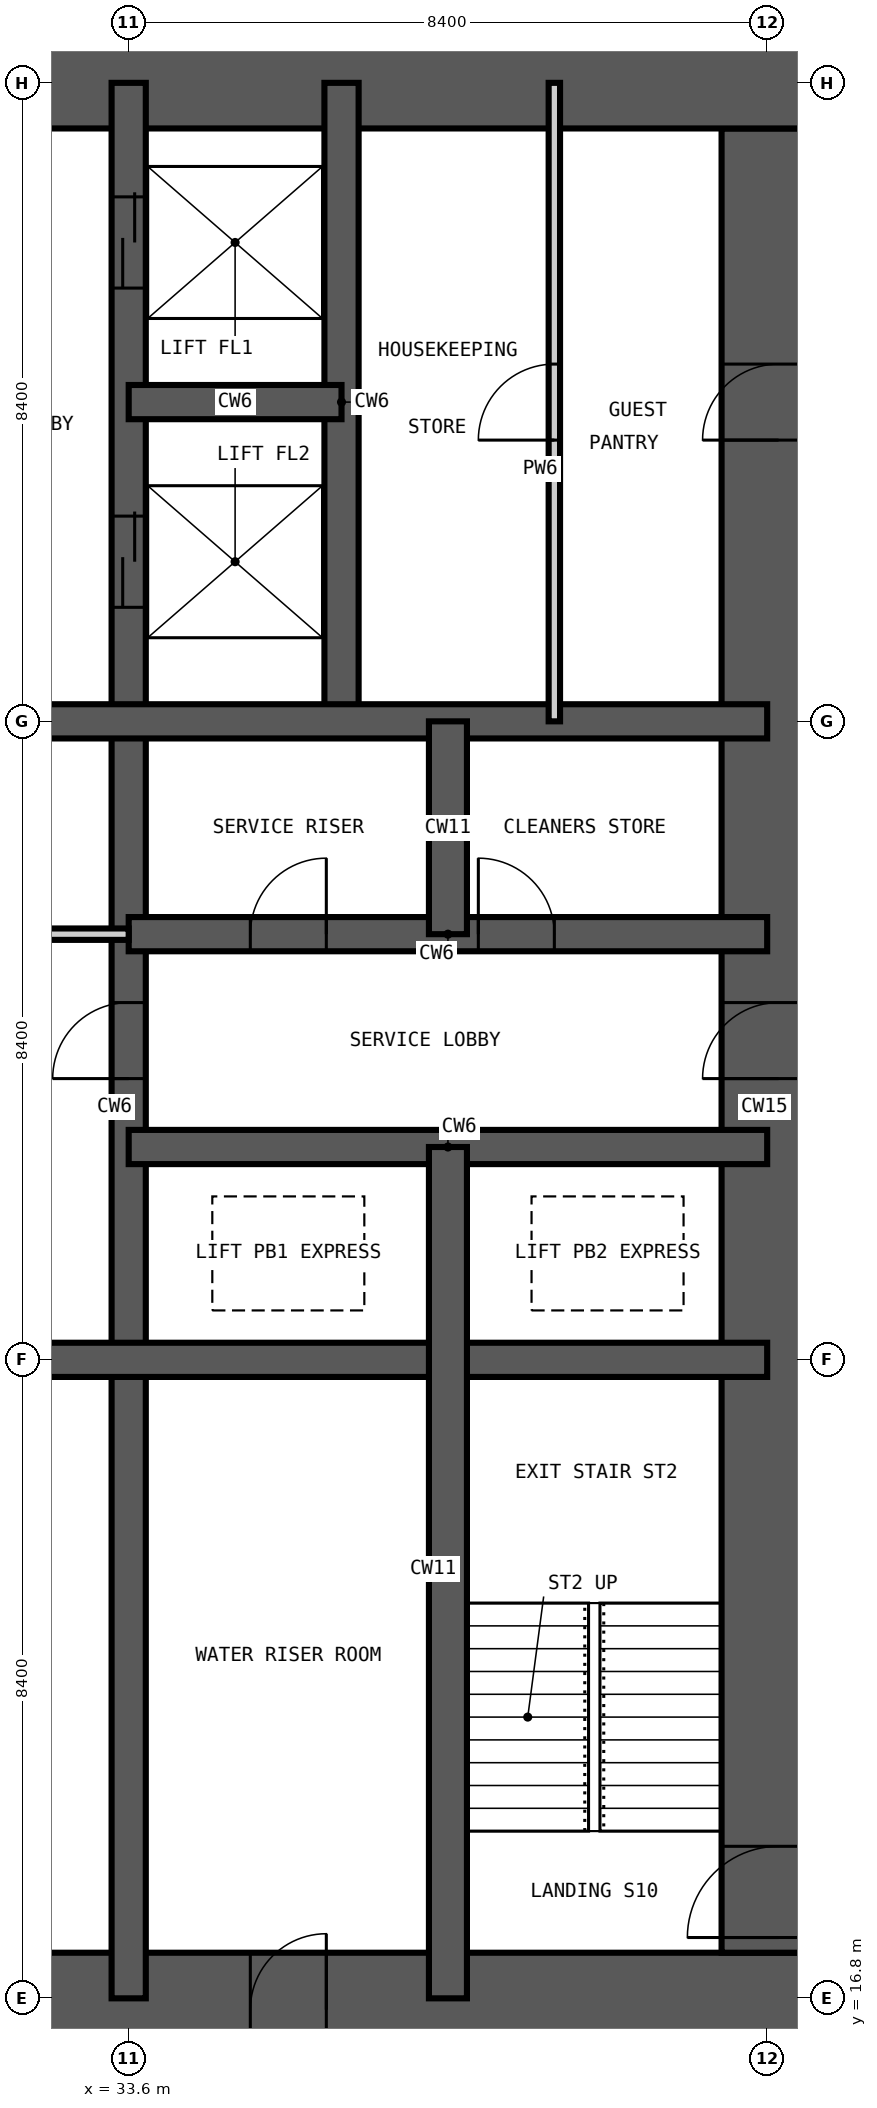
"""IFC4 building model, lengths in metres.
Left out: names, types, materials, properties, quantities, classifications, styles, units other than length and angle.
Written with IfcOpenShell. Run it as: python <this file> out.ifc"""

import sys

from ifc_helpers import new_model, si_unit, direction, frame, frame_2d, origin, place, context, subcontext, project, spatial, rectangle, extrude, element, fill, save


model = new_model("IFC4")
c1 = context("Model", 3, precision=1e-05, world=origin(), true_north=direction((0.0, 1.0)))
c2 = subcontext(c1, "Body", "Model", "MODEL_VIEW")
j1 = project(units=[si_unit("LENGTHUNIT", "METRE"), si_unit("PLANEANGLEUNIT", "RADIAN")], contexts=[c1])
p1 = place(None, origin())
s1 = spatial("IfcSite", under=j1, at=p1, CompositionType="ELEMENT")
p2 = place(p1, origin())
s2 = spatial("IfcBuilding", under=s1, at=p2, CompositionType="ELEMENT")
p3 = place(p2, frame((0.0, 0.0, 84.6)))
s3 = spatial("IfcBuildingStorey", under=s2, at=p3, CompositionType="ELEMENT", Elevation=84.6)
p4 = place(p3, frame((15.9, 16.65, -0.35), z_axis=(0.0, 0.0, 1.0), x_axis=(1.0, 0.0, 0.0)))
e1 = element("IfcWall", 1, at=p4, inside=s3, PredefinedType="SHEAR", context=c2, shape_type="SweptSolid", body=[
    extrude(rectangle(XDim=27.0, YDim=1.5, at=frame_2d((13.5, 0.0))), origin(), (0.0, 0.0, 1.0), 3.55),
])
p5 = place(p4, frame((13.0, 0.0, 0.35)))
e2 = element("IfcOpeningElement", 2, at=p5, cuts=e1, PredefinedType="OPENING", context=c2, shape_type="SweptSolid", body=[
    extrude(rectangle(XDim=1.0, YDim=2.1, at=frame_2d((0.5, 1.05))), frame((0.0, 0.76, 0.0), z_axis=(0.0, -1.0, 0.0), x_axis=(1.0, 0.0, 0.0)), (0.0, 0.0, 1.0), 1.52),
])
p6 = place(p4, frame((19.3, 0.0, 0.35)))
e3 = element("IfcOpeningElement", 3, at=p6, cuts=e1, PredefinedType="OPENING", context=c2, shape_type="SweptSolid", body=[
    extrude(rectangle(XDim=1.0, YDim=2.1, at=frame_2d((0.5, 1.05))), frame((0.0, 0.76, 0.0), z_axis=(0.0, -1.0, 0.0), x_axis=(1.0, 0.0, 0.0)), (0.0, 0.0, 1.0), 1.52),
])
p7 = place(p3, frame((42.15, 17.4, -0.35), z_axis=(0.0, 0.0, 1.0), x_axis=(0.0, 1.0, 0.0)))
e4 = element("IfcWall", 4, at=p7, inside=s3, PredefinedType="SHEAR", context=c2, shape_type="SweptSolid", body=[
    extrude(rectangle(XDim=24.0, YDim=1.5, at=frame_2d((12.0, 0.0))), origin(), (0.0, 0.0, 1.0), 3.55),
])
p8 = place(p7, frame((0.2, 0.0, 0.35)))
e5 = element("IfcOpeningElement", 5, at=p8, cuts=e4, PredefinedType="OPENING", context=c2, shape_type="SweptSolid", body=[
    extrude(rectangle(XDim=1.2, YDim=2.2, at=frame_2d((0.6, 1.1))), frame((0.0, 0.76, 0.0), z_axis=(0.0, -1.0, 0.0), x_axis=(1.0, 0.0, 0.0)), (0.0, 0.0, 1.0), 1.52),
])
p9 = place(p7, frame((11.5, 0.0, 0.35)))
e6 = element("IfcOpeningElement", 6, at=p9, cuts=e4, PredefinedType="OPENING", context=c2, shape_type="SweptSolid", body=[
    extrude(rectangle(XDim=1.0, YDim=2.1, at=frame_2d((0.5, 1.05))), frame((0.0, 0.76, 0.0), z_axis=(0.0, -1.0, 0.0), x_axis=(1.0, 0.0, 0.0)), (0.0, 0.0, 1.0), 1.52),
])
p10 = place(p7, frame((19.9, 0.0, 0.35)))
e7 = element("IfcOpeningElement", 7, at=p10, cuts=e4, PredefinedType="OPENING", context=c2, shape_type="SweptSolid", body=[
    extrude(rectangle(XDim=1.0, YDim=2.1, at=frame_2d((0.5, 1.05))), frame((0.0, 0.76, 0.0), z_axis=(0.0, -1.0, 0.0), x_axis=(1.0, 0.0, 0.0)), (0.0, 0.0, 1.0), 1.52),
])
p11 = place(p3, frame((42.9, 42.15, -0.35), z_axis=(0.0, 0.0, 1.0), x_axis=(-1.0, 0.0, 0.0)))
e8 = element("IfcWall", 8, at=p11, inside=s3, PredefinedType="SHEAR", context=c2, shape_type="SweptSolid", body=[
    extrude(rectangle(XDim=27.0, YDim=1.5, at=frame_2d((13.5, 0.0))), origin(), (0.0, 0.0, 1.0), 3.55),
])
p12 = place(p11, frame((21.4, 0.0, 0.35)))
e9 = element("IfcOpeningElement", 9, at=p12, cuts=e8, PredefinedType="OPENING", context=c2, shape_type="SweptSolid", body=[
    extrude(rectangle(XDim=1.0, YDim=2.1, at=frame_2d((0.5, 1.05))), frame((0.0, 0.76, 0.0), z_axis=(0.0, -1.0, 0.0), x_axis=(1.0, 0.0, 0.0)), (0.0, 0.0, 1.0), 1.52),
])
p13 = place(p11, frame((10.8, 0.0, 0.35)))
e10 = element("IfcOpeningElement", 10, at=p13, cuts=e8, PredefinedType="OPENING", context=c2, shape_type="SweptSolid", body=[
    extrude(rectangle(XDim=1.2, YDim=2.2, at=frame_2d((0.6, 1.1))), frame((0.0, 0.76, 0.0), z_axis=(0.0, -1.0, 0.0), x_axis=(1.0, 0.0, 0.0)), (0.0, 0.0, 1.0), 1.52),
])
p14 = place(p3, frame((33.6, 16.8, -0.35), z_axis=(0.0, 0.0, 1.0), x_axis=(0.0, 1.0, 0.0)))
e11 = element("IfcWall", 11, at=p14, inside=s3, PredefinedType="SHEAR", context=c2, shape_type="SweptSolid", body=[
    extrude(rectangle(XDim=25.2, YDim=0.45, at=frame_2d((12.6, 0.0))), origin(), (0.0, 0.0, 1.0), 3.55),
])
p15 = place(p14, frame((22.5, 0.0, 0.35)))
e12 = element("IfcOpeningElement", 12, at=p15, cuts=e11, PredefinedType="OPENING", context=c2, shape_type="SweptSolid", body=[
    extrude(rectangle(XDim=1.2, YDim=2.2, at=frame_2d((0.6, 1.1))), frame((0.0, 0.235, 0.0), z_axis=(0.0, -1.0, 0.0), x_axis=(1.0, 0.0, 0.0)), (0.0, 0.0, 1.0), 0.47),
])
p16 = place(p14, frame((18.3, 0.0, 0.35)))
e13 = element("IfcOpeningElement", 13, at=p16, cuts=e11, PredefinedType="OPENING", context=c2, shape_type="SweptSolid", body=[
    extrude(rectangle(XDim=1.2, YDim=2.2, at=frame_2d((0.6, 1.1))), frame((0.0, 0.235, 0.0), z_axis=(0.0, -1.0, 0.0), x_axis=(1.0, 0.0, 0.0)), (0.0, 0.0, 1.0), 0.47),
])
p17 = place(p14, frame((12.1, 0.0, 0.35)))
e14 = element("IfcOpeningElement", 14, at=p17, cuts=e11, PredefinedType="OPENING", context=c2, shape_type="SweptSolid", body=[
    extrude(rectangle(XDim=1.0, YDim=2.1, at=frame_2d((0.5, 1.05))), frame((0.0, 0.235, 0.0), z_axis=(0.0, -1.0, 0.0), x_axis=(1.0, 0.0, 0.0)), (0.0, 0.0, 1.0), 0.47),
])
p18 = place(p3, frame((36.4, 33.6, -0.35), z_axis=(0.0, 0.0, 1.0), x_axis=(0.0, 1.0, 0.0)))
e15 = element("IfcWall", 15, at=p18, inside=s3, PredefinedType="SHEAR", context=c2, shape_type="SweptSolid", body=[
    extrude(rectangle(XDim=8.4, YDim=0.45, at=frame_2d((4.2, 0.0))), origin(), (0.0, 0.0, 1.0), 3.55),
])
p19 = place(p3, frame((16.8, 25.2, -0.35), z_axis=(0.0, 0.0, 1.0), x_axis=(1.0, 0.0, 0.0)))
e16 = element("IfcWall", 16, at=p19, inside=s3, PredefinedType="SHEAR", context=c2, shape_type="SweptSolid", body=[
    extrude(rectangle(XDim=25.2, YDim=0.45, at=frame_2d((12.6, 0.0))), origin(), (0.0, 0.0, 1.0), 3.55),
])
p20 = place(p3, frame((33.6, 28.0, -0.35), z_axis=(0.0, 0.0, 1.0), x_axis=(1.0, 0.0, 0.0)))
e17 = element("IfcWall", 17, at=p20, inside=s3, PredefinedType="SHEAR", context=c2, shape_type="SweptSolid", body=[
    extrude(rectangle(XDim=8.4, YDim=0.45, at=frame_2d((4.2, 0.0))), origin(), (0.0, 0.0, 1.0), 3.55),
])
p21 = place(p3, frame((33.6, 30.8, -0.35), z_axis=(0.0, 0.0, 1.0), x_axis=(1.0, 0.0, 0.0)))
e18 = element("IfcWall", 18, at=p21, inside=s3, PredefinedType="SHEAR", context=c2, shape_type="SweptSolid", body=[
    extrude(rectangle(XDim=8.4, YDim=0.45, at=frame_2d((4.2, 0.0))), origin(), (0.0, 0.0, 1.0), 3.55),
])
p22 = place(p21, frame((1.6, 0.0, 0.35)))
e19 = element("IfcOpeningElement", 19, at=p22, cuts=e18, PredefinedType="OPENING", context=c2, shape_type="SweptSolid", body=[
    extrude(rectangle(XDim=1.0, YDim=2.1, at=frame_2d((0.5, 1.05))), frame((0.0, 0.235, 0.0), z_axis=(0.0, -1.0, 0.0), x_axis=(1.0, 0.0, 0.0)), (0.0, 0.0, 1.0), 0.47),
])
p23 = place(p21, frame((4.6, 0.0, 0.35)))
e20 = element("IfcOpeningElement", 20, at=p23, cuts=e18, PredefinedType="OPENING", context=c2, shape_type="SweptSolid", body=[
    extrude(rectangle(XDim=1.0, YDim=2.1, at=frame_2d((0.5, 1.05))), frame((0.0, 0.235, 0.0), z_axis=(0.0, -1.0, 0.0), x_axis=(1.0, 0.0, 0.0)), (0.0, 0.0, 1.0), 0.47),
])
p24 = place(p3, frame((16.8, 33.6, -0.35), z_axis=(0.0, 0.0, 1.0), x_axis=(1.0, 0.0, 0.0)))
e21 = element("IfcWall", 21, at=p24, inside=s3, PredefinedType="SHEAR", context=c2, shape_type="SweptSolid", body=[
    extrude(rectangle(XDim=25.2, YDim=0.45, at=frame_2d((12.6, 0.0))), origin(), (0.0, 0.0, 1.0), 3.55),
])
p25 = place(p3, frame((33.6, 37.8, -0.35), z_axis=(0.0, 0.0, 1.0), x_axis=(1.0, 0.0, 0.0)))
e22 = element("IfcWall", 22, at=p25, inside=s3, PredefinedType="SHEAR", context=c2, shape_type="SweptSolid", body=[
    extrude(rectangle(XDim=2.8, YDim=0.45, at=frame_2d((1.4, 0.0))), origin(), (0.0, 0.0, 1.0), 3.55),
])
p26 = place(p3, frame((37.8, 16.8, -0.35), z_axis=(0.0, 0.0, 1.0), x_axis=(0.0, 1.0, 0.0)))
e23 = element("IfcWall", 23, at=p26, inside=s3, PredefinedType="SHEAR", context=c2, shape_type="SweptSolid", body=[
    extrude(rectangle(XDim=11.2, YDim=0.5, at=frame_2d((5.6, 0.0))), origin(), (0.0, 0.0, 1.0), 3.55),
])
p27 = place(p3, frame((37.8, 30.8, -0.35), z_axis=(0.0, 0.0, 1.0), x_axis=(0.0, 1.0, 0.0)))
e24 = element("IfcWall", 24, at=p27, inside=s3, PredefinedType="SHEAR", context=c2, shape_type="SweptSolid", body=[
    extrude(rectangle(XDim=2.8, YDim=0.5, at=frame_2d((1.4, 0.0))), origin(), (0.0, 0.0, 1.0), 3.55),
])
p28 = place(p3, frame((39.2, 33.6, 0.0), z_axis=(0.0, 0.0, 1.0), x_axis=(0.0, 1.0, 0.0)))
e25 = element("IfcWall", 25, at=p28, inside=s3, PredefinedType="PARTITIONING", context=c2, shape_type="SweptSolid", body=[
    extrude(rectangle(XDim=8.4, YDim=0.15, at=frame_2d((4.2, 0.0))), origin(), (0.0, 0.0, 1.0), 3.2),
])
p29 = place(p28, frame((3.7, 0.0, 0.0)))
e26 = element("IfcOpeningElement", 26, at=p29, cuts=e25, PredefinedType="OPENING", context=c2, shape_type="SweptSolid", body=[
    extrude(rectangle(XDim=1.0, YDim=2.1, at=frame_2d((0.5, 1.05))), frame((0.0, 0.085, 0.0), z_axis=(0.0, -1.0, 0.0), x_axis=(1.0, 0.0, 0.0)), (0.0, 0.0, 1.0), 0.17),
])
p30 = place(p3, frame((25.2, 30.8, 0.0), z_axis=(0.0, 0.0, 1.0), x_axis=(1.0, 0.0, 0.0)))
e27 = element("IfcWall", 27, at=p30, inside=s3, PredefinedType="PARTITIONING", context=c2, shape_type="SweptSolid", body=[
    extrude(rectangle(XDim=8.4, YDim=0.15, at=frame_2d((4.2, 0.0))), origin(), (0.0, 0.0, 1.0), 3.2),
])
p31 = place(p30, frame((3.7, 0.0, 0.0)))
e28 = element("IfcOpeningElement", 28, at=p31, cuts=e27, PredefinedType="OPENING", context=c2, shape_type="SweptSolid", body=[
    extrude(rectangle(XDim=1.0, YDim=2.1, at=frame_2d((0.5, 1.05))), frame((0.0, 0.085, 0.0), z_axis=(0.0, -1.0, 0.0), x_axis=(1.0, 0.0, 0.0)), (0.0, 0.0, 1.0), 0.17),
])
p32 = place(p8, origin())
e29 = element("IfcDoor", 29, at=p32, inside=s3, OperationType="SINGLE_SWING_LEFT", PredefinedType="DOOR", context=c2, shape_type="SweptSolid", body=[
    extrude(rectangle(XDim=1.2, YDim=2.2, at=frame_2d((0.6, 1.1))), frame((0.0, 0.025, 0.0), z_axis=(0.0, -1.0, 0.0), x_axis=(1.0, 0.0, 0.0)), (0.0, 0.0, 1.0), 0.05),
])
fill(e5, e29)
p33 = place(p15, origin())
e30 = element("IfcDoor", 30, at=p33, inside=s3, OperationType="DOUBLE_DOOR_SLIDING", PredefinedType="DOOR", context=c2, shape_type="SweptSolid", body=[
    extrude(rectangle(XDim=1.2, YDim=2.2, at=frame_2d((0.6, 1.1))), frame((0.0, 0.025, 0.0), z_axis=(0.0, -1.0, 0.0), x_axis=(1.0, 0.0, 0.0)), (0.0, 0.0, 1.0), 0.05),
])
fill(e12, e30)
p34 = place(p16, origin())
e31 = element("IfcDoor", 31, at=p34, inside=s3, OperationType="DOUBLE_DOOR_SLIDING", PredefinedType="DOOR", context=c2, shape_type="SweptSolid", body=[
    extrude(rectangle(XDim=1.2, YDim=2.2, at=frame_2d((0.6, 1.1))), frame((0.0, 0.025, 0.0), z_axis=(0.0, -1.0, 0.0), x_axis=(1.0, 0.0, 0.0)), (0.0, 0.0, 1.0), 0.05),
])
fill(e13, e31)
p35 = place(p17, origin())
e32 = element("IfcDoor", 32, at=p35, inside=s3, OperationType="SINGLE_SWING_LEFT", PredefinedType="DOOR", context=c2, shape_type="SweptSolid", body=[
    extrude(rectangle(XDim=1.0, YDim=2.1, at=frame_2d((0.5, 1.05))), frame((0.0, 0.025, 0.0), z_axis=(0.0, -1.0, 0.0), x_axis=(1.0, 0.0, 0.0)), (0.0, 0.0, 1.0), 0.05),
])
fill(e14, e32)
p36 = place(p22, origin())
e33 = element("IfcDoor", 33, at=p36, inside=s3, OperationType="SINGLE_SWING_RIGHT", PredefinedType="DOOR", context=c2, shape_type="SweptSolid", body=[
    extrude(rectangle(XDim=1.0, YDim=2.1, at=frame_2d((0.5, 1.05))), frame((0.0, 0.025, 0.0), z_axis=(0.0, -1.0, 0.0), x_axis=(1.0, 0.0, 0.0)), (0.0, 0.0, 1.0), 0.05),
])
fill(e19, e33)
p37 = place(p23, origin())
e34 = element("IfcDoor", 34, at=p37, inside=s3, OperationType="SINGLE_SWING_LEFT", PredefinedType="DOOR", context=c2, shape_type="SweptSolid", body=[
    extrude(rectangle(XDim=1.0, YDim=2.1, at=frame_2d((0.5, 1.05))), frame((0.0, 0.025, 0.0), z_axis=(0.0, -1.0, 0.0), x_axis=(1.0, 0.0, 0.0)), (0.0, 0.0, 1.0), 0.05),
])
fill(e20, e34)
p38 = place(p9, origin())
e35 = element("IfcDoor", 35, at=p38, inside=s3, OperationType="SINGLE_SWING_LEFT", PredefinedType="DOOR", context=c2, shape_type="SweptSolid", body=[
    extrude(rectangle(XDim=1.0, YDim=2.1, at=frame_2d((0.5, 1.05))), frame((0.0, 0.025, 0.0), z_axis=(0.0, -1.0, 0.0), x_axis=(1.0, 0.0, 0.0)), (0.0, 0.0, 1.0), 0.05),
])
fill(e6, e35)
p39 = place(p10, origin())
e36 = element("IfcDoor", 36, at=p39, inside=s3, OperationType="SINGLE_SWING_LEFT", PredefinedType="DOOR", context=c2, shape_type="SweptSolid", body=[
    extrude(rectangle(XDim=1.0, YDim=2.1, at=frame_2d((0.5, 1.05))), frame((0.0, 0.025, 0.0), z_axis=(0.0, -1.0, 0.0), x_axis=(1.0, 0.0, 0.0)), (0.0, 0.0, 1.0), 0.05),
])
fill(e7, e36)
p40 = place(p29, origin())
e37 = element("IfcDoor", 37, at=p40, inside=s3, OperationType="SINGLE_SWING_LEFT", PredefinedType="DOOR", context=c2, shape_type="SweptSolid", body=[
    extrude(rectangle(XDim=1.0, YDim=2.1, at=frame_2d((0.5, 1.05))), frame((0.0, 0.025, 0.0), z_axis=(0.0, -1.0, 0.0), x_axis=(1.0, 0.0, 0.0)), (0.0, 0.0, 1.0), 0.05),
])
fill(e26, e37)
p41 = place(p6, origin())
e38 = element("IfcDoor", 38, at=p41, inside=s3, OperationType="SINGLE_SWING_RIGHT", PredefinedType="DOOR", context=c2, shape_type="SweptSolid", body=[
    extrude(rectangle(XDim=1.0, YDim=2.1, at=frame_2d((0.5, 1.05))), frame((0.0, 0.025, 0.0), z_axis=(0.0, -1.0, 0.0), x_axis=(1.0, 0.0, 0.0)), (0.0, 0.0, 1.0), 0.05),
])
fill(e3, e38)
save(model, sys.argv[1])
